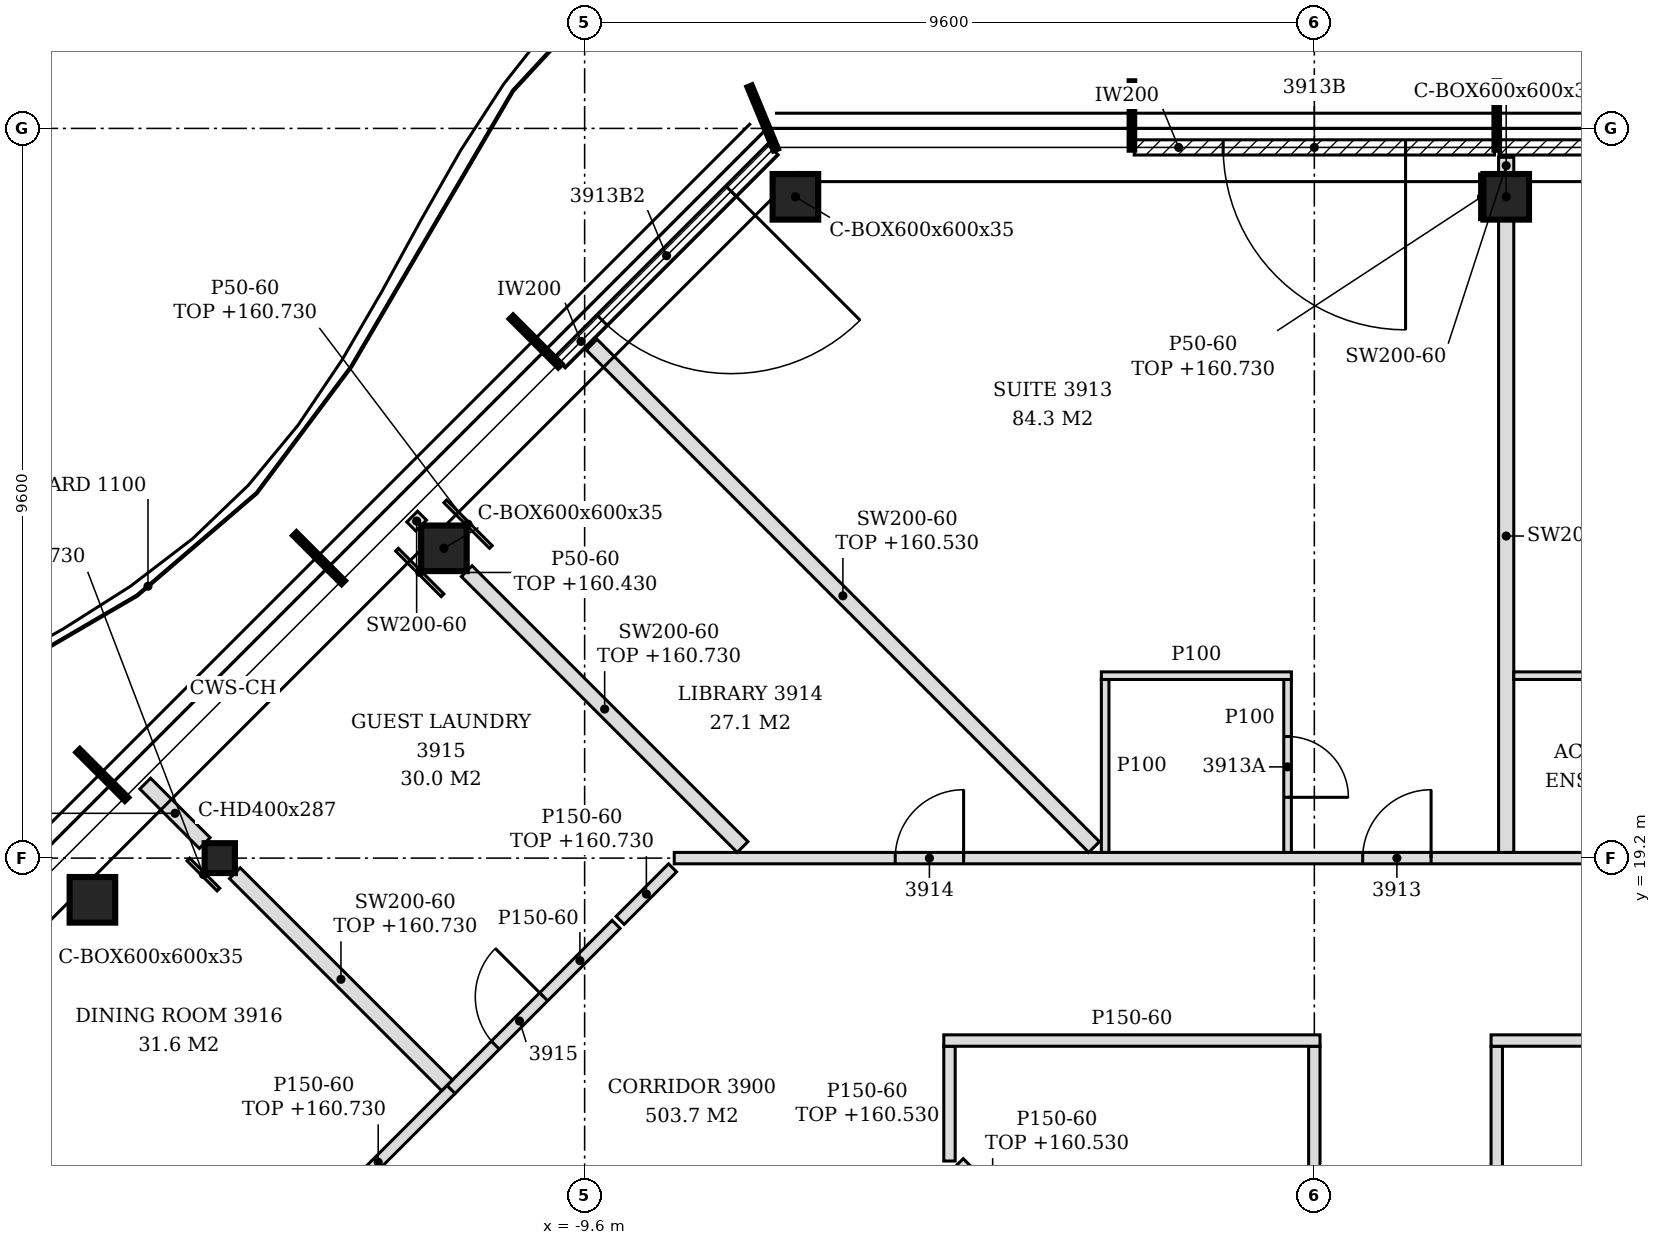
"""IFC4 building model, lengths in metres.
Left out: names, types, materials, properties, quantities, classifications, styles, units other than length and angle.
Written with IfcOpenShell. Run it as: python <this file> out.ifc"""

import sys

from ifc_helpers import new_model, si_unit, direction, frame, frame_2d, origin, origin_2d, place, context, subcontext, project, spatial, polyline, rectangle, hollow_rectangle, i_section, outline, extrude, element, fill, save


model = new_model("IFC4")
c1 = context("Model", 3, precision=1e-05, world=origin(), true_north=direction((0.0, 1.0)))
c2 = subcontext(c1, "Body", "Model", "MODEL_VIEW")
j1 = project(units=[si_unit("LENGTHUNIT", "METRE"), si_unit("PLANEANGLEUNIT", "RADIAN")], contexts=[c1])
p1 = place(None, origin())
s1 = spatial("IfcSite", under=j1, at=p1, CompositionType="ELEMENT")
p2 = place(p1, origin())
s2 = spatial("IfcBuilding", under=s1, at=p2, CompositionType="ELEMENT")
p3 = place(p2, frame((0.0, 0.0, 157.8)))
s3 = spatial("IfcBuildingStorey", under=s2, at=p3, CompositionType="ELEMENT", Elevation=157.8)
for number, where, z_axis, x_axis in (
    (1, (2.524, 27.9, -0.15), (0.0, 0.0, 1.0), (1.0, 0.0, 0.0)),
    (2, (-6.827, 27.9, -0.15), (0.0, 0.0, 1.0), (1.0, 0.0, 0.0)),
    (3, (-11.451, 23.276, -0.15), (0.0, 0.0, 1.0), (1.0, 0.0, 0.0)),
    (4, (-16.076, 18.652, -0.15), (0.0, 0.0, 1.0), (1.0, 0.0, 0.0)),
):
    element("IfcColumn", number, at=place(p3, frame(where, z_axis=z_axis, x_axis=x_axis)), inside=s3, PredefinedType="COLUMN", context=c2, shape_type="SweptSolid", body=[
        extrude(hollow_rectangle(XDim=0.6, YDim=0.6, WallThickness=0.035, at=origin_2d()), origin(), (0.0, 0.0, 1.0), 3.6),
    ])
p4 = place(p3, frame((-14.4, 19.2, -0.15), z_axis=(0.0, 0.0, 1.0), x_axis=(1.0, 0.0, 0.0)))
e5 = element("IfcColumn", 5, at=p4, inside=s3, PredefinedType="COLUMN", context=c2, shape_type="SweptSolid", body=[
    extrude(i_section(OverallWidth=0.399, OverallDepth=0.393, WebThickness=0.023, FlangeThickness=0.037, FilletRadius=0.015, at=origin_2d()), origin(), (0.0, 0.0, 1.0), 3.6),
])
p5 = place(p3, frame((7.17, 28.55, 0.0), z_axis=(0.0, 0.0, 1.0), x_axis=(-1.0, 0.0, 0.0)))
e6 = element("IfcWall", 6, at=p5, inside=s3, PredefinedType="NOTDEFINED", context=c2, shape_type="SweptSolid", body=[
    extrude(rectangle(XDim=4.74, YDim=0.2, at=frame_2d((2.37, 0.0))), origin(), (0.0, 0.0, 1.0), 3.45),
])
p6 = place(p5, frame((1.17, 0.0, 0.0)))
e7 = element("IfcOpeningElement", 7, at=p6, cuts=e6, PredefinedType="OPENING", context=c2, shape_type="SweptSolid", body=[
    extrude(rectangle(XDim=2.4, YDim=2.4, at=frame_2d((1.2, 1.2))), frame((0.0, 0.11, 0.0), z_axis=(0.0, -1.0, 0.0), x_axis=(1.0, 0.0, 0.0)), (0.0, 0.0, 1.0), 0.22),
])
p7 = place(p3, frame((2.37, 28.55, 0.0), z_axis=(0.0, 0.0, 1.0), x_axis=(-1.0, 0.0, 0.0)))
e8 = element("IfcWall", 8, at=p7, inside=s3, PredefinedType="NOTDEFINED", context=c2, shape_type="SweptSolid", body=[
    extrude(rectangle(XDim=4.74, YDim=0.2, at=frame_2d((2.37, 0.0))), origin(), (0.0, 0.0, 1.0), 3.45),
])
p8 = place(p7, frame((1.17, 0.0, 0.0)))
e9 = element("IfcOpeningElement", 9, at=p8, cuts=e8, PredefinedType="OPENING", context=c2, shape_type="SweptSolid", body=[
    extrude(rectangle(XDim=2.4, YDim=2.4, at=frame_2d((1.2, 1.2))), frame((0.0, 0.11, 0.0), z_axis=(0.0, -1.0, 0.0), x_axis=(1.0, 0.0, 0.0)), (0.0, 0.0, 1.0), 0.22),
])
p9 = place(p3, frame((-7.125, 28.522, 0.0), z_axis=(0.0, 0.0, 1.0), x_axis=(-0.707106781187, -0.707106781187, 0.0)))
e10 = element("IfcWall", 10, at=p9, inside=s3, PredefinedType="NOTDEFINED", context=c2, shape_type="SweptSolid", body=[
    extrude(rectangle(XDim=3.962, YDim=0.2, at=frame_2d((1.981, 0.0))), origin(), (0.0, 0.0, 1.0), 3.45),
])
p10 = place(p9, frame((0.775, 0.0, 0.0)))
e11 = element("IfcOpeningElement", 11, at=p10, cuts=e10, PredefinedType="OPENING", context=c2, shape_type="SweptSolid", body=[
    extrude(rectangle(XDim=2.4, YDim=2.4, at=frame_2d((1.2, 1.2))), frame((0.0, 0.11, 0.0), z_axis=(0.0, -1.0, 0.0), x_axis=(1.0, 0.0, 0.0)), (0.0, 0.0, 1.0), 0.22),
])
p11 = place(p3, frame((-13.346, 11.298, 0.0), z_axis=(0.0, 0.0, 1.0), x_axis=(-0.707106781187, 0.707106781187, 0.0)))
e12 = element("IfcWall", 12, at=p11, inside=s3, PredefinedType="PARTITIONING", context=c2, shape_type="SweptSolid", body=[
    extrude(rectangle(XDim=7.65, YDim=0.2, at=frame_2d((3.825, 0.0))), origin(), (0.0, 0.0, 1.0), 2.93),
])
for number, where, z_axis, x_axis in (
    (13, (0.0, 13.275, 0.0), (0.0, 0.0, 1.0), (0.0, 1.0, 0.0)),
    (14, (2.4, 13.275, 0.0), (0.0, 0.0, 1.0), (0.0, 1.0, 0.0)),
):
    element("IfcWall", number, at=place(p3, frame(where, z_axis=z_axis, x_axis=x_axis)), inside=s3, PredefinedType="PARTITIONING", context=c2, shape_type="SweptSolid", body=[
        extrude(outline(polyline([(0.0, 0.0), (3.45, 0.0), (3.45, 3.45), (0.075, 3.45), (0.073, 2.83), (0.0, 2.83), (0.0, 0.0)])), frame((0.0, 0.075, 0.0), z_axis=(0.0, -1.0, 0.0), x_axis=(1.0, 0.0, 0.0)), (0.0, 0.0, 1.0), 0.15),
    ])
p12 = place(p3, frame((-13.275, 14.24, 0.0), z_axis=(0.0, 0.0, 1.0), x_axis=(0.707286821097, 0.706926695424, 0.0)))
e15 = element("IfcWall", 15, at=p12, inside=s3, PredefinedType="PARTITIONING", context=c2, shape_type="SweptSolid", body=[
    extrude(rectangle(XDim=2.712, YDim=0.15, at=frame_2d((1.356, 0.0))), origin(), (0.0, 0.0, 1.0), 2.93),
])
p13 = place(p3, frame((-3.792, 14.314, 0.0), z_axis=(0.0, 0.0, 1.0), x_axis=(-0.707499182195, 0.706714162298, 0.0)))
e16 = element("IfcWall", 16, at=p13, inside=s3, PredefinedType="PARTITIONING", context=c2, shape_type="SweptSolid", body=[
    extrude(rectangle(XDim=1.244, YDim=0.15, at=frame_2d((0.622, 0.0))), origin(), (0.0, 0.0, 1.0), 2.73),
])
p14 = place(p3, frame((-4.8, 15.215, 0.0), z_axis=(0.0, 0.0, 1.0), x_axis=(0.0, 1.0, 0.0)))
e17 = element("IfcWall", 17, at=p14, inside=s3, PredefinedType="PARTITIONING", context=c2, shape_type="SweptSolid", body=[
    extrude(rectangle(XDim=1.51, YDim=0.15, at=frame_2d((0.755, 0.0))), origin(), (0.0, 0.0, 1.0), 2.73),
])
p15 = place(p3, frame((-11.357, 16.157, 0.0), z_axis=(0.0, 0.0, 1.0), x_axis=(0.707106781187, 0.707106781187, 0.0)))
e18 = element("IfcWall", 18, at=p15, inside=s3, PredefinedType="PARTITIONING", context=c2, shape_type="SweptSolid", body=[
    extrude(rectangle(XDim=3.071, YDim=0.15, at=frame_2d((1.535, 0.0))), origin(), (0.0, 0.0, 1.0), 3.45),
])
p16 = place(p15, frame((0.823, 0.0, 0.0)))
e19 = element("IfcOpeningElement", 19, at=p16, cuts=e18, PredefinedType="OPENING", context=c2, shape_type="SweptSolid", body=[
    extrude(rectangle(XDim=0.9, YDim=2.1, at=frame_2d((0.45, 1.05))), frame((0.0, 0.085, 0.0), z_axis=(0.0, -1.0, 0.0), x_axis=(1.0, 0.0, 0.0)), (0.0, 0.0, 1.0), 0.17),
])
p17 = place(p3, frame((-11.41, 16.21, 0.0), z_axis=(0.0, 0.0, 1.0), x_axis=(-0.707106781187, 0.707106781187, 0.0)))
e20 = element("IfcWall", 20, at=p17, inside=s3, PredefinedType="PARTITIONING", context=c2, shape_type="SweptSolid", body=[
    extrude(rectangle(XDim=3.948, YDim=0.2, at=frame_2d((1.974, 0.0))), origin(), (0.0, 0.0, 1.0), 2.93),
])
p18 = place(p3, frame((-4.875, 16.8, 0.0), z_axis=(0.0, 0.0, 1.0), x_axis=(1.0, 0.0, 0.0)))
e21 = element("IfcWall", 21, at=p18, inside=s3, PredefinedType="PARTITIONING", context=c2, shape_type="SweptSolid", body=[
    extrude(outline(polyline([(0.0, 0.0), (4.95, 0.0), (4.95, 3.45), (0.225, 3.45), (0.223, 2.73), (0.0, 2.73), (0.0, 0.0)])), frame((0.0, 0.075, 0.0), z_axis=(0.0, -1.0, 0.0), x_axis=(1.0, 0.0, 0.0)), (0.0, 0.0, 1.0), 0.15),
])
p19 = place(p3, frame((2.325, 16.8, 0.0), z_axis=(0.0, 0.0, 1.0), x_axis=(1.0, 0.0, 0.0)))
e22 = element("IfcWall", 22, at=p19, inside=s3, PredefinedType="PARTITIONING", context=c2, shape_type="SweptSolid", body=[
    extrude(outline(polyline([(0.0, 0.0), (16.95, 0.0), (16.95, 2.73), (16.725, 2.73), (16.723, 3.45), (5.025, 3.45), (5.023, 2.73), (4.725, 2.73), (4.723, 3.45), (0.0, 3.45), (0.0, 0.0)])), frame((0.0, 0.075, 0.0), z_axis=(0.0, -1.0, 0.0), x_axis=(1.0, 0.0, 0.0)), (0.0, 0.0, 1.0), 0.15),
])
p20 = place(p3, frame((-9.133, 18.381, 0.0), z_axis=(0.0, 0.0, 1.0), x_axis=(0.706731558776, 0.707481804593, 0.0)))
e23 = element("IfcWall", 23, at=p20, inside=s3, PredefinedType="PARTITIONING", context=c2, shape_type="SweptSolid", body=[
    extrude(rectangle(XDim=0.976, YDim=0.15, at=frame_2d((0.488, 0.0))), origin(), (0.0, 0.0, 1.0), 2.93),
])
p21 = place(p3, frame((-8.421, 19.2, 0.0), z_axis=(0.0, 0.0, 1.0), x_axis=(1.0, 0.0, 0.0)))
e24 = element("IfcWall", 24, at=p21, inside=s3, PredefinedType="PARTITIONING", context=c2, shape_type="SweptSolid", body=[
    extrude(outline(polyline([(0.0, 0.0), (31.242, 0.0), (31.242, 2.88), (27.771, 2.88), (27.769, 2.73), (27.471, 2.73), (27.469, 2.88), (15.771, 2.88), (15.769, 2.73), (15.471, 2.73), (15.469, 2.88), (3.771, 2.88), (3.769, 2.73), (3.471, 2.73), (3.469, 2.88), (0.0, 2.88), (0.0, 0.0)])), frame((0.0, 0.075, 0.0), z_axis=(0.0, -1.0, 0.0), x_axis=(1.0, 0.0, 0.0)), (0.0, 0.0, 1.0), 0.15),
])
p22 = place(p21, frame((25.997, 0.0, 0.0)))
e25 = element("IfcOpeningElement", 25, at=p22, cuts=e24, PredefinedType="OPENING", context=c2, shape_type="SweptSolid", body=[
    extrude(rectangle(XDim=0.9, YDim=2.1, at=frame_2d((0.45, 1.05))), frame((0.0, 0.085, 0.0), z_axis=(0.0, -1.0, 0.0), x_axis=(1.0, 0.0, 0.0)), (0.0, 0.0, 1.0), 0.17),
])
p23 = place(p21, frame((17.93, 0.0, 0.0)))
e26 = element("IfcOpeningElement", 26, at=p23, cuts=e24, PredefinedType="OPENING", context=c2, shape_type="SweptSolid", body=[
    extrude(rectangle(XDim=0.9, YDim=2.1, at=frame_2d((0.45, 1.05))), frame((0.0, 0.085, 0.0), z_axis=(0.0, -1.0, 0.0), x_axis=(1.0, 0.0, 0.0)), (0.0, 0.0, 1.0), 0.17),
])
p24 = place(p21, frame((14.754, 0.0, 0.0)))
e27 = element("IfcOpeningElement", 27, at=p24, cuts=e24, PredefinedType="OPENING", context=c2, shape_type="SweptSolid", body=[
    extrude(rectangle(XDim=0.9, YDim=2.1, at=frame_2d((0.45, 1.05))), frame((0.0, 0.085, 0.0), z_axis=(0.0, -1.0, 0.0), x_axis=(1.0, 0.0, 0.0)), (0.0, 0.0, 1.0), 0.17),
])
p25 = place(p21, frame((9.057, 0.0, 0.0)))
e28 = element("IfcOpeningElement", 28, at=p25, cuts=e24, PredefinedType="OPENING", context=c2, shape_type="SweptSolid", body=[
    extrude(rectangle(XDim=0.9, YDim=2.1, at=frame_2d((0.45, 1.05))), frame((0.0, 0.085, 0.0), z_axis=(0.0, -1.0, 0.0), x_axis=(1.0, 0.0, 0.0)), (0.0, 0.0, 1.0), 0.17),
])
p26 = place(p21, frame((2.907, 0.0, 0.0)))
e29 = element("IfcOpeningElement", 29, at=p26, cuts=e24, PredefinedType="OPENING", context=c2, shape_type="SweptSolid", body=[
    extrude(rectangle(XDim=0.9, YDim=2.1, at=frame_2d((0.45, 1.05))), frame((0.0, 0.085, 0.0), z_axis=(0.0, -1.0, 0.0), x_axis=(1.0, 0.0, 0.0)), (0.0, 0.0, 1.0), 0.17),
])
p27 = place(p3, frame((-7.522, 19.346, 0.0), z_axis=(0.0, 0.0, 1.0), x_axis=(-0.707106781187, 0.707106781187, 0.0)))
e30 = element("IfcWall", 30, at=p27, inside=s3, PredefinedType="PARTITIONING", context=c2, shape_type="SweptSolid", body=[
    extrude(rectangle(XDim=5.134, YDim=0.2, at=frame_2d((2.567, 0.0))), origin(), (0.0, 0.0, 1.0), 2.93),
])
p28 = place(p3, frame((-2.898, 19.346, 0.0), z_axis=(0.0, 0.0, 1.0), x_axis=(-0.707106781187, 0.707106781187, 0.0)))
e31 = element("IfcWall", 31, at=p28, inside=s3, PredefinedType="PARTITIONING", context=c2, shape_type="SweptSolid", body=[
    extrude(rectangle(XDim=9.347, YDim=0.2, at=frame_2d((4.674, 0.0))), origin(), (0.0, 0.0, 1.0), 2.73),
])
p29 = place(p3, frame((-2.752, 19.275, 0.0), z_axis=(0.0, 0.0, 1.0), x_axis=(0.0, 1.0, 0.0)))
e32 = element("IfcWall", 32, at=p29, inside=s3, PredefinedType="PARTITIONING", context=c2, shape_type="SweptSolid", body=[
    extrude(outline(polyline([(0.0, 0.0), (2.275, 0.0), (2.275, 3.45), (0.03, 3.45), (0.028, 2.88), (0.0, 2.88), (0.0, 0.0)])), frame((0.0, 0.05, 0.0), z_axis=(0.0, -1.0, 0.0), x_axis=(1.0, 0.0, 0.0)), (0.0, 0.0, 1.0), 0.1),
])
p30 = place(p3, frame((-0.352, 19.275, 0.0), z_axis=(0.0, 0.0, 1.0), x_axis=(0.0, 1.0, 0.0)))
e33 = element("IfcWall", 33, at=p30, inside=s3, PredefinedType="PARTITIONING", context=c2, shape_type="SweptSolid", body=[
    extrude(outline(polyline([(0.0, 0.0), (2.275, 0.0), (2.275, 3.45), (0.03, 3.45), (0.028, 2.88), (0.0, 2.88), (0.0, 0.0)])), frame((0.0, 0.05, 0.0), z_axis=(0.0, -1.0, 0.0), x_axis=(1.0, 0.0, 0.0)), (0.0, 0.0, 1.0), 0.1),
])
p31 = place(p30, frame((0.725, 0.0, 0.0)))
e34 = element("IfcOpeningElement", 34, at=p31, cuts=e33, PredefinedType="OPENING", context=c2, shape_type="SweptSolid", body=[
    extrude(rectangle(XDim=0.8, YDim=2.1, at=frame_2d((0.4, 1.05))), frame((0.0, 0.06, 0.0), z_axis=(0.0, -1.0, 0.0), x_axis=(1.0, 0.0, 0.0)), (0.0, 0.0, 1.0), 0.12),
])
p32 = place(p3, frame((2.524, 19.275, 0.0), z_axis=(0.0, 0.0, 1.0), x_axis=(0.0, 1.0, 0.0)))
e35 = element("IfcWall", 35, at=p32, inside=s3, PredefinedType="PARTITIONING", context=c2, shape_type="SweptSolid", body=[
    extrude(outline(polyline([(0.0, 0.0), (8.325, 0.0), (8.325, 3.45), (4.83, 3.45), (4.828, 2.88), (4.62, 2.88), (4.618, 3.45), (0.03, 3.45), (0.028, 2.88), (0.0, 2.88), (0.0, 0.0)])), frame((0.0, 0.1, 0.0), z_axis=(0.0, -1.0, 0.0), x_axis=(1.0, 0.0, 0.0)), (0.0, 0.0, 1.0), 0.2),
])
p33 = place(p3, frame((-14.598, 19.398, 0.0), z_axis=(0.0, 0.0, 1.0), x_axis=(-0.707106781187, 0.707106781187, 0.0)))
e36 = element("IfcWall", 36, at=p33, inside=s3, PredefinedType="PARTITIONING", context=c2, shape_type="SweptSolid", body=[
    extrude(rectangle(XDim=1.107, YDim=0.2, at=frame_2d((0.554, 0.0))), origin(), (0.0, 0.0, 1.0), 2.63),
])
p34 = place(p3, frame((-2.802, 21.6, 0.0), z_axis=(0.0, 0.0, 1.0), x_axis=(1.0, 0.0, 0.0)))
e37 = element("IfcWall", 37, at=p34, inside=s3, PredefinedType="PARTITIONING", context=c2, shape_type="SweptSolid", body=[
    extrude(rectangle(XDim=2.5, YDim=0.1, at=frame_2d((1.25, 0.0))), origin(), (0.0, 0.0, 1.0), 3.45),
])
p35 = place(p3, frame((2.624, 21.6, 0.0), z_axis=(0.0, 0.0, 1.0), x_axis=(1.0, 0.0, 0.0)))
e38 = element("IfcWall", 38, at=p35, inside=s3, PredefinedType="PARTITIONING", context=c2, shape_type="SweptSolid", body=[
    extrude(rectangle(XDim=2.95, YDim=0.1, at=frame_2d((1.475, 0.0))), origin(), (0.0, 0.0, 1.0), 3.45),
])
p36 = place(p35, frame((0.95, 0.0, 0.0)))
e39 = element("IfcOpeningElement", 39, at=p36, cuts=e38, PredefinedType="OPENING", context=c2, shape_type="SweptSolid", body=[
    extrude(rectangle(XDim=0.9, YDim=2.1, at=frame_2d((0.45, 1.05))), frame((0.0, 0.06, 0.0), z_axis=(0.0, -1.0, 0.0), x_axis=(1.0, 0.0, 0.0)), (0.0, 0.0, 1.0), 0.12),
])
p37 = place(p3, frame((-11.752, 23.576, 0.0), z_axis=(0.0, 0.0, 1.0), x_axis=(-0.707106781187, 0.707106781187, 0.0)))
e40 = element("IfcWall", 40, at=p37, inside=s3, PredefinedType="PARTITIONING", context=c2, shape_type="SweptSolid", body=[
    extrude(rectangle(XDim=0.166, YDim=0.2, at=frame_2d((0.083, 0.0))), origin(), (0.0, 0.0, 1.0), 3.45),
])
p38 = place(p3, frame((2.524, 28.2, 0.0), z_axis=(0.0, 0.0, 1.0), x_axis=(0.0, 1.0, 0.0)))
e41 = element("IfcWall", 41, at=p38, inside=s3, PredefinedType="PARTITIONING", context=c2, shape_type="SweptSolid", body=[
    extrude(rectangle(XDim=0.22, YDim=0.2, at=frame_2d((0.11, 0.0))), origin(), (0.0, 0.0, 1.0), 3.45),
])
p39 = place(p3, frame((-14.418, 18.786, 0.0), z_axis=(0.0, 0.0, 1.0), x_axis=(-0.707106781187, 0.707106781187, 0.0)))
e42 = element("IfcWall", 42, at=p39, inside=s3, PredefinedType="PARTITIONING", context=c2, shape_type="SweptSolid", body=[
    extrude(rectangle(XDim=0.56, YDim=0.05, at=frame_2d((0.28, 0.0))), origin(), (0.0, 0.0, 1.0), 2.93),
])
p40 = place(p3, frame((-11.469, 22.658, 0.0), z_axis=(0.0, 0.0, 1.0), x_axis=(-0.706962899457, 0.707250633645, 0.0)))
e43 = element("IfcWall", 43, at=p40, inside=s3, PredefinedType="PARTITIONING", context=c2, shape_type="SweptSolid", body=[
    extrude(rectangle(XDim=0.848, YDim=0.05, at=frame_2d((0.424, 0.0))), origin(), (0.0, 0.0, 1.0), 2.63),
])
p41 = place(p3, frame((-10.834, 23.293, 0.0), z_axis=(0.0, 0.0, 1.0), x_axis=(-0.707250633645, 0.706962899457, 0.0)))
e44 = element("IfcWall", 44, at=p41, inside=s3, PredefinedType="PARTITIONING", context=c2, shape_type="SweptSolid", body=[
    extrude(rectangle(XDim=0.848, YDim=0.05, at=frame_2d((0.424, 0.0))), origin(), (0.0, 0.0, 1.0), 2.93),
])
p42 = place(p3, frame((2.199, 27.6, 0.0), z_axis=(0.0, 0.0, 1.0), x_axis=(0.0, 1.0, 0.0)))
e45 = element("IfcWall", 45, at=p42, inside=s3, PredefinedType="PARTITIONING", context=c2, shape_type="SweptSolid", body=[
    extrude(rectangle(XDim=0.6, YDim=0.05, at=frame_2d((0.3, 0.0))), origin(), (0.0, 0.0, 1.0), 2.93),
])
p43 = place(p8, origin())
e46 = element("IfcDoor", 46, at=p43, inside=s3, OperationType="SINGLE_SWING_LEFT", PredefinedType="DOOR", context=c2, shape_type="SweptSolid", body=[
    extrude(rectangle(XDim=2.4, YDim=2.4, at=frame_2d((1.2, 1.2))), frame((0.0, 0.025, 0.0), z_axis=(0.0, -1.0, 0.0), x_axis=(1.0, 0.0, 0.0)), (0.0, 0.0, 1.0), 0.05),
])
fill(e9, e46)
p44 = place(p10, origin())
e47 = element("IfcDoor", 47, at=p44, inside=s3, OperationType="SINGLE_SWING_LEFT", PredefinedType="DOOR", context=c2, shape_type="SweptSolid", body=[
    extrude(rectangle(XDim=2.4, YDim=2.4, at=frame_2d((1.2, 1.2))), frame((0.0, 0.025, 0.0), z_axis=(0.0, -1.0, 0.0), x_axis=(1.0, 0.0, 0.0)), (0.0, 0.0, 1.0), 0.05),
])
fill(e11, e47)
p45 = place(p25, origin())
e48 = element("IfcDoor", 48, at=p45, inside=s3, OperationType="SINGLE_SWING_RIGHT", PredefinedType="DOOR", context=c2, shape_type="SweptSolid", body=[
    extrude(rectangle(XDim=0.9, YDim=2.1, at=frame_2d((0.45, 1.05))), frame((0.0, 0.025, 0.0), z_axis=(0.0, -1.0, 0.0), x_axis=(1.0, 0.0, 0.0)), (0.0, 0.0, 1.0), 0.05),
])
fill(e28, e48)
p46 = place(p31, frame((0.8, 0.0, 0.0), z_axis=(0.0, 0.0, 1.0), x_axis=(-1.0, 0.0, 0.0)))
e49 = element("IfcDoor", 49, at=p46, inside=s3, OperationType="SINGLE_SWING_RIGHT", PredefinedType="DOOR", context=c2, shape_type="SweptSolid", body=[
    extrude(rectangle(XDim=0.8, YDim=2.1, at=frame_2d((0.4, 1.05))), frame((0.0, 0.025, 0.0), z_axis=(0.0, -1.0, 0.0), x_axis=(1.0, 0.0, 0.0)), (0.0, 0.0, 1.0), 0.05),
])
fill(e34, e49)
p47 = place(p26, origin())
e50 = element("IfcDoor", 50, at=p47, inside=s3, OperationType="SINGLE_SWING_RIGHT", PredefinedType="DOOR", context=c2, shape_type="SweptSolid", body=[
    extrude(rectangle(XDim=0.9, YDim=2.1, at=frame_2d((0.45, 1.05))), frame((0.0, 0.025, 0.0), z_axis=(0.0, -1.0, 0.0), x_axis=(1.0, 0.0, 0.0)), (0.0, 0.0, 1.0), 0.05),
])
fill(e29, e50)
p48 = place(p16, origin())
e51 = element("IfcDoor", 51, at=p48, inside=s3, OperationType="SINGLE_SWING_RIGHT", PredefinedType="DOOR", context=c2, shape_type="SweptSolid", body=[
    extrude(rectangle(XDim=0.9, YDim=2.1, at=frame_2d((0.45, 1.05))), frame((0.0, 0.025, 0.0), z_axis=(0.0, -1.0, 0.0), x_axis=(1.0, 0.0, 0.0)), (0.0, 0.0, 1.0), 0.05),
])
fill(e19, e51)
save(model, sys.argv[1])
